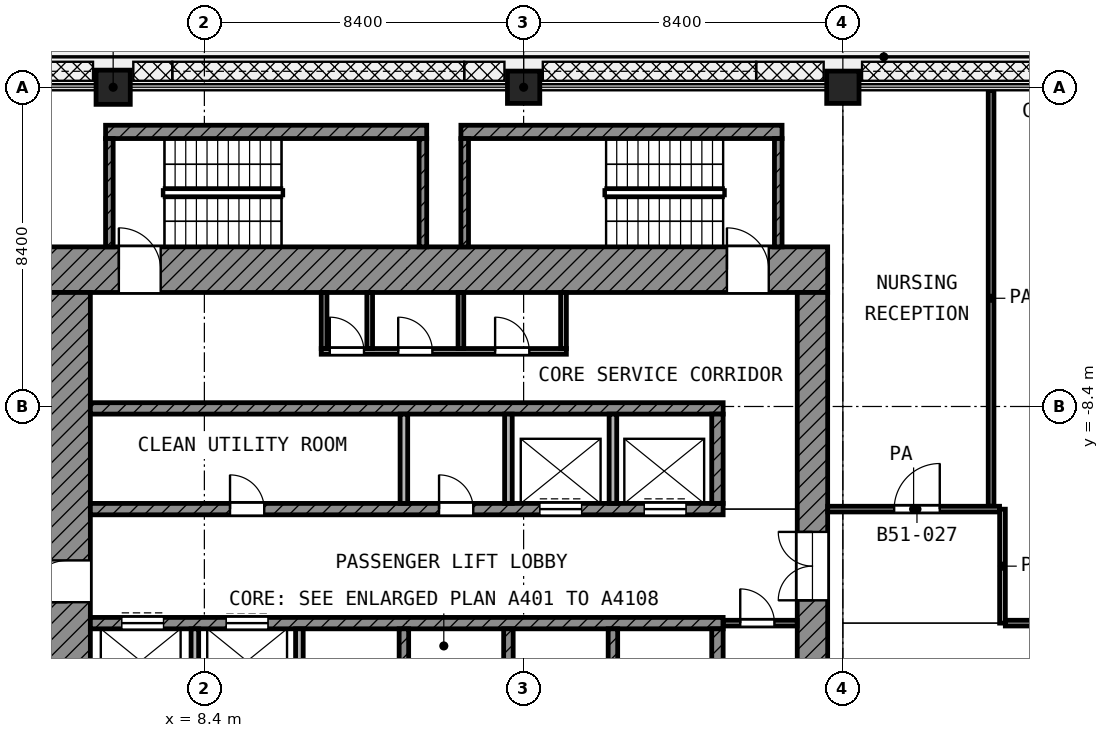
"""IFC4 building model, lengths in metres.
Left out: names, types, materials, properties, quantities, classifications, styles, units other than length and angle.
Written with IfcOpenShell. Run it as: python <this file> out.ifc"""

import sys

from ifc_helpers import new_model, si_unit, direction, frame, frame_2d, origin, origin_2d, place, context, subcontext, project, spatial, rectangle, extrude, element, fill, save


model = new_model("IFC4")
c1 = context("Model", 3, precision=1e-05, world=origin(), true_north=direction((0.0, 1.0)))
c2 = subcontext(c1, "Body", "Model", "MODEL_VIEW")
j1 = project(units=[si_unit("LENGTHUNIT", "METRE"), si_unit("PLANEANGLEUNIT", "RADIAN")], contexts=[c1])
p1 = place(None, origin())
s1 = spatial("IfcSite", under=j1, at=p1, CompositionType="ELEMENT")
p2 = place(p1, origin())
s2 = spatial("IfcBuilding", under=s1, at=p2, CompositionType="ELEMENT")
p3 = place(p2, frame((0.0, 0.0, 222.2)))
s3 = spatial("IfcBuildingStorey", under=s2, at=p3, CompositionType="ELEMENT", Elevation=222.2)
p4 = place(p3, frame((6.0, 0.0, 0.0), z_axis=(0.0, 0.0, 1.0), x_axis=(1.0, 0.0, 0.0)))
e1 = element("IfcColumn", 1, at=p4, inside=s3, PredefinedType="COLUMN", context=c2, shape_type="SweptSolid", body=[
    extrude(rectangle(XDim=0.9, YDim=0.9, at=origin_2d()), origin(), (0.0, 0.0, 1.0), 4.2),
])
for number, where, z_axis, x_axis in (
    (2, (16.8, 0.0, 0.0), (0.0, 0.0, 1.0), (1.0, 0.0, 0.0)),
    (3, (25.2, 0.0, 0.0), (0.0, 0.0, 1.0), (1.0, 0.0, 0.0)),
):
    element("IfcColumn", number, at=place(p3, frame(where, z_axis=z_axis, x_axis=x_axis)), inside=s3, PredefinedType="COLUMN", context=c2, shape_type="SweptSolid", body=[
        extrude(rectangle(XDim=0.85, YDim=0.85, at=origin_2d()), origin(), (0.0, 0.0, 1.0), 4.2),
    ])
p5 = place(p3, frame((4.2, -4.8, 0.0), z_axis=(0.0, 0.0, 1.0), x_axis=(1.0, 0.0, 0.0)))
e4 = element("IfcWall", 4, at=p5, inside=s3, PredefinedType="SHEAR", context=c2, shape_type="SweptSolid", body=[
    extrude(rectangle(XDim=20.6, YDim=1.2, at=frame_2d((10.3, 0.0))), origin(), (0.0, 0.0, 1.0), 3.6),
])
p6 = place(p5, frame((1.95, 0.0, 0.0)))
e5 = element("IfcOpeningElement", 5, at=p6, cuts=e4, PredefinedType="OPENING", context=c2, shape_type="SweptSolid", body=[
    extrude(rectangle(XDim=1.1, YDim=2.1, at=frame_2d((0.55, 1.05))), frame((0.0, 0.61, 0.0), z_axis=(0.0, -1.0, 0.0), x_axis=(1.0, 0.0, 0.0)), (0.0, 0.0, 1.0), 1.22),
])
p7 = place(p5, frame((17.95, 0.0, 0.0)))
e6 = element("IfcOpeningElement", 6, at=p7, cuts=e4, PredefinedType="OPENING", context=c2, shape_type="SweptSolid", body=[
    extrude(rectangle(XDim=1.1, YDim=2.1, at=frame_2d((0.55, 1.05))), frame((0.0, 0.61, 0.0), z_axis=(0.0, -1.0, 0.0), x_axis=(1.0, 0.0, 0.0)), (0.0, 0.0, 1.0), 1.22),
])
p8 = place(p3, frame((4.8, -24.8, 0.0), z_axis=(0.0, 0.0, 1.0), x_axis=(0.0, 1.0, 0.0)))
e7 = element("IfcWall", 7, at=p8, inside=s3, PredefinedType="SHEAR", context=c2, shape_type="SweptSolid", body=[
    extrude(rectangle(XDim=19.4, YDim=1.2, at=frame_2d((9.7, 0.0))), origin(), (0.0, 0.0, 1.0), 3.6),
])
p9 = place(p8, frame((11.25, 0.0, 0.0)))
e8 = element("IfcOpeningElement", 8, at=p9, cuts=e7, PredefinedType="OPENING", context=c2, shape_type="SweptSolid", body=[
    extrude(rectangle(XDim=1.1, YDim=2.1, at=frame_2d((0.55, 1.05))), frame((0.0, 0.61, 0.0), z_axis=(0.0, -1.0, 0.0), x_axis=(1.0, 0.0, 0.0)), (0.0, 0.0, 1.0), 1.22),
])
p10 = place(p8, frame((1.95, 0.0, 0.0)))
e9 = element("IfcOpeningElement", 9, at=p10, cuts=e7, PredefinedType="OPENING", context=c2, shape_type="SweptSolid", body=[
    extrude(rectangle(XDim=1.1, YDim=2.1, at=frame_2d((0.55, 1.05))), frame((0.0, 0.61, 0.0), z_axis=(0.0, -1.0, 0.0), x_axis=(1.0, 0.0, 0.0)), (0.0, 0.0, 1.0), 1.22),
])
p11 = place(p3, frame((24.4, -24.0, 0.0), z_axis=(0.0, 0.0, 1.0), x_axis=(0.0, 1.0, 0.0)))
e10 = element("IfcWall", 10, at=p11, inside=s3, PredefinedType="SHEAR", context=c2, shape_type="SweptSolid", body=[
    extrude(rectangle(XDim=18.6, YDim=0.8, at=frame_2d((9.3, 0.0))), origin(), (0.0, 0.0, 1.0), 3.6),
])
p12 = place(p11, frame((10.5, 0.0, 0.0)))
e11 = element("IfcOpeningElement", 11, at=p12, cuts=e10, PredefinedType="OPENING", context=c2, shape_type="SweptSolid", body=[
    extrude(rectangle(XDim=1.8, YDim=2.1, at=frame_2d((0.9, 1.05))), frame((0.0, 0.41, 0.0), z_axis=(0.0, -1.0, 0.0), x_axis=(1.0, 0.0, 0.0)), (0.0, 0.0, 1.0), 0.82),
])
p13 = place(p3, frame((5.4, -8.45, 0.0), z_axis=(0.0, 0.0, 1.0), x_axis=(1.0, 0.0, 0.0)))
e12 = element("IfcWall", 12, at=p13, inside=s3, PredefinedType="SHEAR", context=c2, shape_type="SweptSolid", body=[
    extrude(rectangle(XDim=16.65, YDim=0.3, at=frame_2d((8.325, 0.0))), origin(), (0.0, 0.0, 1.0), 3.6),
])
p14 = place(p3, frame((5.4, -11.1, 0.0), z_axis=(0.0, 0.0, 1.0), x_axis=(1.0, 0.0, 0.0)))
e13 = element("IfcWall", 13, at=p14, inside=s3, PredefinedType="SHEAR", context=c2, shape_type="SweptSolid", body=[
    extrude(rectangle(XDim=16.65, YDim=0.3, at=frame_2d((8.325, 0.0))), origin(), (0.0, 0.0, 1.0), 3.6),
])
p15 = place(p14, frame((11.825, 0.0, 0.0)))
e14 = element("IfcOpeningElement", 14, at=p15, cuts=e13, PredefinedType="OPENING", context=c2, shape_type="SweptSolid", body=[
    extrude(rectangle(XDim=1.1, YDim=2.1, at=frame_2d((0.55, 1.05))), frame((0.0, 0.16, 0.0), z_axis=(0.0, -1.0, 0.0), x_axis=(1.0, 0.0, 0.0)), (0.0, 0.0, 1.0), 0.32),
])
p16 = place(p14, frame((14.575, 0.0, 0.0)))
e15 = element("IfcOpeningElement", 15, at=p16, cuts=e13, PredefinedType="OPENING", context=c2, shape_type="SweptSolid", body=[
    extrude(rectangle(XDim=1.1, YDim=2.1, at=frame_2d((0.55, 1.05))), frame((0.0, 0.16, 0.0), z_axis=(0.0, -1.0, 0.0), x_axis=(1.0, 0.0, 0.0)), (0.0, 0.0, 1.0), 0.32),
])
p17 = place(p14, frame((3.675, 0.0, 0.0)))
e16 = element("IfcOpeningElement", 16, at=p17, cuts=e13, PredefinedType="OPENING", context=c2, shape_type="SweptSolid", body=[
    extrude(rectangle(XDim=0.9, YDim=2.1, at=frame_2d((0.45, 1.05))), frame((0.0, 0.16, 0.0), z_axis=(0.0, -1.0, 0.0), x_axis=(1.0, 0.0, 0.0)), (0.0, 0.0, 1.0), 0.32),
])
p18 = place(p14, frame((9.175, 0.0, 0.0)))
e17 = element("IfcOpeningElement", 17, at=p18, cuts=e13, PredefinedType="OPENING", context=c2, shape_type="SweptSolid", body=[
    extrude(rectangle(XDim=0.9, YDim=2.1, at=frame_2d((0.45, 1.05))), frame((0.0, 0.16, 0.0), z_axis=(0.0, -1.0, 0.0), x_axis=(1.0, 0.0, 0.0)), (0.0, 0.0, 1.0), 0.32),
])
p19 = place(p3, frame((5.4, -14.1, 0.0), z_axis=(0.0, 0.0, 1.0), x_axis=(1.0, 0.0, 0.0)))
e18 = element("IfcWall", 18, at=p19, inside=s3, PredefinedType="SHEAR", context=c2, shape_type="SweptSolid", body=[
    extrude(rectangle(XDim=16.65, YDim=0.3, at=frame_2d((8.325, 0.0))), origin(), (0.0, 0.0, 1.0), 3.6),
])
p20 = place(p19, frame((0.825, 0.0, 0.0)))
e19 = element("IfcOpeningElement", 19, at=p20, cuts=e18, PredefinedType="OPENING", context=c2, shape_type="SweptSolid", body=[
    extrude(rectangle(XDim=1.1, YDim=2.1, at=frame_2d((0.55, 1.05))), frame((0.0, 0.16, 0.0), z_axis=(0.0, -1.0, 0.0), x_axis=(1.0, 0.0, 0.0)), (0.0, 0.0, 1.0), 0.32),
])
p21 = place(p19, frame((3.575, 0.0, 0.0)))
e20 = element("IfcOpeningElement", 20, at=p21, cuts=e18, PredefinedType="OPENING", context=c2, shape_type="SweptSolid", body=[
    extrude(rectangle(XDim=1.1, YDim=2.1, at=frame_2d((0.55, 1.05))), frame((0.0, 0.16, 0.0), z_axis=(0.0, -1.0, 0.0), x_axis=(1.0, 0.0, 0.0)), (0.0, 0.0, 1.0), 0.32),
])
p22 = place(p3, frame((21.9, -10.95, 0.0), z_axis=(0.0, 0.0, 1.0), x_axis=(0.0, 1.0, 0.0)))
e21 = element("IfcWall", 21, at=p22, inside=s3, PredefinedType="SHEAR", context=c2, shape_type="SweptSolid", body=[
    extrude(rectangle(XDim=2.35, YDim=0.3, at=frame_2d((1.175, 0.0))), origin(), (0.0, 0.0, 1.0), 3.6),
])
p23 = place(p3, frame((21.9, -16.6, 0.0), z_axis=(0.0, 0.0, 1.0), x_axis=(0.0, 1.0, 0.0)))
e22 = element("IfcWall", 22, at=p23, inside=s3, PredefinedType="SHEAR", context=c2, shape_type="SweptSolid", body=[
    extrude(rectangle(XDim=2.35, YDim=0.3, at=frame_2d((1.175, 0.0))), origin(), (0.0, 0.0, 1.0), 3.6),
])
for number, where, z_axis, x_axis in (
    (23, (13.65, -10.95, 0.0), (0.0, 0.0, 1.0), (0.0, 1.0, 0.0)),
    (24, (16.4, -10.95, 0.0), (0.0, 0.0, 1.0), (0.0, 1.0, 0.0)),
    (25, (19.15, -10.95, 0.0), (0.0, 0.0, 1.0), (0.0, 1.0, 0.0)),
):
    element("IfcWall", number, at=place(p3, frame(where, z_axis=z_axis, x_axis=x_axis)), inside=s3, PredefinedType="PARTITIONING", context=c2, shape_type="SweptSolid", body=[
        extrude(rectangle(XDim=2.35, YDim=0.2, at=frame_2d((1.175, 0.0))), origin(), (0.0, 0.0, 1.0), 3.6),
    ])
for number, where, z_axis, x_axis in (
    (26, (8.15, -16.6, 0.0), (0.0, 0.0, 1.0), (0.0, 1.0, 0.0)),
    (27, (10.9, -16.6, 0.0), (0.0, 0.0, 1.0), (0.0, 1.0, 0.0)),
):
    element("IfcWall", number, at=place(p3, frame(where, z_axis=z_axis, x_axis=x_axis)), inside=s3, PredefinedType="PARTITIONING", context=c2, shape_type="SweptSolid", body=[
        extrude(rectangle(XDim=2.35, YDim=0.2, at=frame_2d((1.175, 0.0))), origin(), (0.0, 0.0, 1.0), 3.6),
    ])
for number, where, z_axis, x_axis in (
    (28, (13.65, -16.6, 0.0), (0.0, 0.0, 1.0), (0.0, 1.0, 0.0)),
    (29, (16.4, -16.6, 0.0), (0.0, 0.0, 1.0), (0.0, 1.0, 0.0)),
    (30, (19.15, -16.6, 0.0), (0.0, 0.0, 1.0), (0.0, 1.0, 0.0)),
):
    element("IfcWall", number, at=place(p3, frame(where, z_axis=z_axis, x_axis=x_axis)), inside=s3, PredefinedType="SHEAR", context=c2, shape_type="SweptSolid", body=[
        extrude(rectangle(XDim=2.35, YDim=0.25, at=frame_2d((1.175, 0.0))), origin(), (0.0, 0.0, 1.0), 3.6),
    ])
p24 = place(p3, frame((22.05, -14.1, 0.0), z_axis=(0.0, 0.0, 1.0), x_axis=(1.0, 0.0, 0.0)))
e31 = element("IfcWall", 31, at=p24, inside=s3, PredefinedType="PARTITIONING", context=c2, shape_type="SweptSolid", body=[
    extrude(rectangle(XDim=1.95, YDim=0.15, at=frame_2d((0.975, 0.0))), origin(), (0.0, 0.0, 1.0), 3.6),
])
p25 = place(p24, frame((0.45, 0.0, 0.0)))
e32 = element("IfcOpeningElement", 32, at=p25, cuts=e31, PredefinedType="OPENING", context=c2, shape_type="SweptSolid", body=[
    extrude(rectangle(XDim=0.9, YDim=2.1, at=frame_2d((0.45, 1.05))), frame((0.0, 0.085, 0.0), z_axis=(0.0, -1.0, 0.0), x_axis=(1.0, 0.0, 0.0)), (0.0, 0.0, 1.0), 0.17),
])
p26 = place(p3, frame((11.475, -6.95, 0.0), z_axis=(0.0, 0.0, 1.0), x_axis=(1.0, 0.0, 0.0)))
e33 = element("IfcWall", 33, at=p26, inside=s3, PredefinedType="PARTITIONING", context=c2, shape_type="SweptSolid", body=[
    extrude(rectangle(XDim=6.45, YDim=0.15, at=frame_2d((3.225, 0.0))), origin(), (0.0, 0.0, 1.0), 3.6),
])
p27 = place(p26, frame((0.225, 0.0, 0.0)))
e34 = element("IfcOpeningElement", 34, at=p27, cuts=e33, PredefinedType="OPENING", context=c2, shape_type="SweptSolid", body=[
    extrude(rectangle(XDim=0.9, YDim=2.1, at=frame_2d((0.45, 1.05))), frame((0.0, 0.085, 0.0), z_axis=(0.0, -1.0, 0.0), x_axis=(1.0, 0.0, 0.0)), (0.0, 0.0, 1.0), 0.17),
])
p28 = place(p26, frame((2.025, 0.0, 0.0)))
e35 = element("IfcOpeningElement", 35, at=p28, cuts=e33, PredefinedType="OPENING", context=c2, shape_type="SweptSolid", body=[
    extrude(rectangle(XDim=0.9, YDim=2.1, at=frame_2d((0.45, 1.05))), frame((0.0, 0.085, 0.0), z_axis=(0.0, -1.0, 0.0), x_axis=(1.0, 0.0, 0.0)), (0.0, 0.0, 1.0), 0.17),
])
p29 = place(p26, frame((4.575, 0.0, 0.0)))
e36 = element("IfcOpeningElement", 36, at=p29, cuts=e33, PredefinedType="OPENING", context=c2, shape_type="SweptSolid", body=[
    extrude(rectangle(XDim=0.9, YDim=2.1, at=frame_2d((0.45, 1.05))), frame((0.0, 0.085, 0.0), z_axis=(0.0, -1.0, 0.0), x_axis=(1.0, 0.0, 0.0)), (0.0, 0.0, 1.0), 0.17),
])
for number, where, z_axis, x_axis in (
    (37, (11.55, -6.875, 0.0), (0.0, 0.0, 1.0), (0.0, 1.0, 0.0)),
    (38, (12.75, -6.875, 0.0), (0.0, 0.0, 1.0), (0.0, 1.0, 0.0)),
    (39, (15.15, -6.875, 0.0), (0.0, 0.0, 1.0), (0.0, 1.0, 0.0)),
    (40, (17.85, -6.875, 0.0), (0.0, 0.0, 1.0), (0.0, 1.0, 0.0)),
):
    element("IfcWall", number, at=place(p3, frame(where, z_axis=z_axis, x_axis=x_axis)), inside=s3, PredefinedType="PARTITIONING", context=c2, shape_type="SweptSolid", body=[
        extrude(rectangle(XDim=1.475, YDim=0.15, at=frame_2d((0.738, 0.0))), origin(), (0.0, 0.0, 1.0), 3.6),
    ])
p30 = place(p3, frame((5.8, -1.175, 0.0), z_axis=(0.0, 0.0, 1.0), x_axis=(1.0, 0.0, 0.0)))
e41 = element("IfcWall", 41, at=p30, inside=s3, PredefinedType="SHEAR", context=c2, shape_type="SweptSolid", body=[
    extrude(rectangle(XDim=8.45, YDim=0.35, at=frame_2d((4.225, 0.0))), origin(), (0.0, 0.0, 1.0), 3.6),
])
for number, where, z_axis, x_axis in (
    (42, (5.9, -4.2, 0.0), (0.0, 0.0, 1.0), (0.0, 1.0, 0.0)),
    (43, (14.15, -4.2, 0.0), (0.0, 0.0, 1.0), (0.0, 1.0, 0.0)),
):
    element("IfcWall", number, at=place(p3, frame(where, z_axis=z_axis, x_axis=x_axis)), inside=s3, PredefinedType="SHEAR", context=c2, shape_type="SweptSolid", body=[
        extrude(rectangle(XDim=2.85, YDim=0.2, at=frame_2d((1.425, 0.0))), origin(), (0.0, 0.0, 1.0), 3.6),
    ])
p31 = place(p3, frame((15.15, -1.175, 0.0), z_axis=(0.0, 0.0, 1.0), x_axis=(1.0, 0.0, 0.0)))
e44 = element("IfcWall", 44, at=p31, inside=s3, PredefinedType="SHEAR", context=c2, shape_type="SweptSolid", body=[
    extrude(rectangle(XDim=8.45, YDim=0.35, at=frame_2d((4.225, 0.0))), origin(), (0.0, 0.0, 1.0), 3.6),
])
for number, where, z_axis, x_axis in (
    (45, (15.25, -4.2, 0.0), (0.0, 0.0, 1.0), (0.0, 1.0, 0.0)),
    (46, (23.5, -4.2, 0.0), (0.0, 0.0, 1.0), (0.0, 1.0, 0.0)),
):
    element("IfcWall", number, at=place(p3, frame(where, z_axis=z_axis, x_axis=x_axis)), inside=s3, PredefinedType="SHEAR", context=c2, shape_type="SweptSolid", body=[
        extrude(rectangle(XDim=2.85, YDim=0.2, at=frame_2d((1.425, 0.0))), origin(), (0.0, 0.0, 1.0), 3.6),
    ])
p32 = place(p3, frame((29.475, -14.1, 0.0), z_axis=(0.0, 0.0, 1.0), x_axis=(1.0, 0.0, 0.0)))
e47 = element("IfcWall", 47, at=p32, inside=s3, PredefinedType="PARTITIONING", context=c2, shape_type="SweptSolid", body=[
    extrude(rectangle(XDim=10.757, YDim=0.15, at=frame_2d((5.378, 0.0))), origin(), (0.0, 0.0, 1.0), 3.6),
])
p33 = place(p32, frame((1.525, 0.0, 0.0)))
e48 = element("IfcOpeningElement", 48, at=p33, cuts=e47, PredefinedType="OPENING", context=c2, shape_type="SweptSolid", body=[
    extrude(rectangle(XDim=1.0, YDim=2.1, at=frame_2d((0.5, 1.05))), frame((0.0, 0.085, 0.0), z_axis=(0.0, -1.0, 0.0), x_axis=(1.0, 0.0, 0.0)), (0.0, 0.0, 1.0), 0.17),
])
p34 = place(p32, frame((4.725, 0.0, 0.0)))
e49 = element("IfcOpeningElement", 49, at=p34, cuts=e47, PredefinedType="OPENING", context=c2, shape_type="SweptSolid", body=[
    extrude(rectangle(XDim=0.9, YDim=2.1, at=frame_2d((0.45, 1.05))), frame((0.0, 0.085, 0.0), z_axis=(0.0, -1.0, 0.0), x_axis=(1.0, 0.0, 0.0)), (0.0, 0.0, 1.0), 0.17),
])
p35 = place(p32, frame((6.775, 0.0, 0.0)))
e50 = element("IfcOpeningElement", 50, at=p35, cuts=e47, PredefinedType="OPENING", context=c2, shape_type="SweptSolid", body=[
    extrude(rectangle(XDim=1.0, YDim=2.1, at=frame_2d((0.5, 1.05))), frame((0.0, 0.085, 0.0), z_axis=(0.0, -1.0, 0.0), x_axis=(1.0, 0.0, 0.0)), (0.0, 0.0, 1.0), 0.17),
])
p36 = place(p3, frame((24.8, -11.1, 0.0), z_axis=(0.0, 0.0, 1.0), x_axis=(1.0, 0.0, 0.0)))
e51 = element("IfcWall", 51, at=p36, inside=s3, PredefinedType="PARTITIONING", context=c2, shape_type="SweptSolid", body=[
    extrude(rectangle(XDim=4.523, YDim=0.15, at=frame_2d((2.261, 0.0))), origin(), (0.0, 0.0, 1.0), 3.6),
])
p37 = place(p36, frame((1.75, 0.0, 0.0)))
e52 = element("IfcOpeningElement", 52, at=p37, cuts=e51, PredefinedType="OPENING", context=c2, shape_type="SweptSolid", body=[
    extrude(rectangle(XDim=1.2, YDim=2.1, at=frame_2d((0.6, 1.05))), frame((0.0, 0.085, 0.0), z_axis=(0.0, -1.0, 0.0), x_axis=(1.0, 0.0, 0.0)), (0.0, 0.0, 1.0), 0.17),
])
p38 = place(p3, frame((29.1, -11.025, 0.0), z_axis=(0.0, 0.0, 1.0), x_axis=(0.0, 1.0, 0.0)))
e53 = element("IfcWall", 53, at=p38, inside=s3, PredefinedType="PARTITIONING", context=c2, shape_type="SweptSolid", body=[
    extrude(rectangle(XDim=10.945, YDim=0.15, at=frame_2d((5.472, 0.0))), origin(), (0.0, 0.0, 1.0), 3.6),
])
p39 = place(p3, frame((29.4, -14.1, 0.0), z_axis=(0.0, 0.0, 1.0), x_axis=(0.0, 1.0, 0.0)))
e54 = element("IfcWall", 54, at=p39, inside=s3, PredefinedType="PARTITIONING", context=c2, shape_type="SweptSolid", body=[
    extrude(rectangle(XDim=2.998, YDim=0.15, at=frame_2d((1.499, 0.0))), origin(), (0.0, 0.0, 1.0), 3.6),
])
p40 = place(p15, origin())
e55 = element("IfcDoor", 55, at=p40, inside=s3, OperationType="DOUBLE_DOOR_SLIDING", PredefinedType="DOOR", context=c2, shape_type="SweptSolid", body=[
    extrude(rectangle(XDim=1.1, YDim=2.1, at=frame_2d((0.55, 1.05))), frame((0.0, 0.025, 0.0), z_axis=(0.0, -1.0, 0.0), x_axis=(1.0, 0.0, 0.0)), (0.0, 0.0, 1.0), 0.05),
])
fill(e14, e55)
p41 = place(p16, origin())
e56 = element("IfcDoor", 56, at=p41, inside=s3, OperationType="DOUBLE_DOOR_SLIDING", PredefinedType="DOOR", context=c2, shape_type="SweptSolid", body=[
    extrude(rectangle(XDim=1.1, YDim=2.1, at=frame_2d((0.55, 1.05))), frame((0.0, 0.025, 0.0), z_axis=(0.0, -1.0, 0.0), x_axis=(1.0, 0.0, 0.0)), (0.0, 0.0, 1.0), 0.05),
])
fill(e15, e56)
p42 = place(p20, origin())
e57 = element("IfcDoor", 57, at=p42, inside=s3, OperationType="DOUBLE_DOOR_SLIDING", PredefinedType="DOOR", context=c2, shape_type="SweptSolid", body=[
    extrude(rectangle(XDim=1.1, YDim=2.1, at=frame_2d((0.55, 1.05))), frame((0.0, 0.025, 0.0), z_axis=(0.0, -1.0, 0.0), x_axis=(1.0, 0.0, 0.0)), (0.0, 0.0, 1.0), 0.05),
])
fill(e19, e57)
p43 = place(p21, origin())
e58 = element("IfcDoor", 58, at=p43, inside=s3, OperationType="DOUBLE_DOOR_SLIDING", PredefinedType="DOOR", context=c2, shape_type="SweptSolid", body=[
    extrude(rectangle(XDim=1.1, YDim=2.1, at=frame_2d((0.55, 1.05))), frame((0.0, 0.025, 0.0), z_axis=(0.0, -1.0, 0.0), x_axis=(1.0, 0.0, 0.0)), (0.0, 0.0, 1.0), 0.05),
])
fill(e20, e58)
p44 = place(p9, origin())
e59 = element("IfcDoor", 59, at=p44, inside=s3, OperationType="SINGLE_SWING_LEFT", PredefinedType="DOOR", context=c2, shape_type="SweptSolid", body=[
    extrude(rectangle(XDim=1.1, YDim=2.1, at=frame_2d((0.55, 1.05))), frame((0.0, 0.025, 0.0), z_axis=(0.0, -1.0, 0.0), x_axis=(1.0, 0.0, 0.0)), (0.0, 0.0, 1.0), 0.05),
])
fill(e8, e59)
p45 = place(p6, origin())
e60 = element("IfcDoor", 60, at=p45, inside=s3, OperationType="SINGLE_SWING_LEFT", PredefinedType="DOOR", context=c2, shape_type="SweptSolid", body=[
    extrude(rectangle(XDim=1.1, YDim=2.1, at=frame_2d((0.55, 1.05))), frame((0.0, 0.025, 0.0), z_axis=(0.0, -1.0, 0.0), x_axis=(1.0, 0.0, 0.0)), (0.0, 0.0, 1.0), 0.05),
])
fill(e5, e60)
p46 = place(p7, origin())
e61 = element("IfcDoor", 61, at=p46, inside=s3, OperationType="SINGLE_SWING_LEFT", PredefinedType="DOOR", context=c2, shape_type="SweptSolid", body=[
    extrude(rectangle(XDim=1.1, YDim=2.1, at=frame_2d((0.55, 1.05))), frame((0.0, 0.025, 0.0), z_axis=(0.0, -1.0, 0.0), x_axis=(1.0, 0.0, 0.0)), (0.0, 0.0, 1.0), 0.05),
])
fill(e6, e61)
p47 = place(p12, origin())
e62 = element("IfcDoor", 62, at=p47, inside=s3, OperationType="DOUBLE_DOOR_SINGLE_SWING", PredefinedType="DOOR", context=c2, shape_type="SweptSolid", body=[
    extrude(rectangle(XDim=1.8, YDim=2.1, at=frame_2d((0.9, 1.05))), frame((0.0, 0.025, 0.0), z_axis=(0.0, -1.0, 0.0), x_axis=(1.0, 0.0, 0.0)), (0.0, 0.0, 1.0), 0.05),
])
fill(e11, e62)
p48 = place(p27, origin())
e63 = element("IfcDoor", 63, at=p48, inside=s3, OperationType="SINGLE_SWING_LEFT", PredefinedType="DOOR", context=c2, shape_type="SweptSolid", body=[
    extrude(rectangle(XDim=0.9, YDim=2.1, at=frame_2d((0.45, 1.05))), frame((0.0, 0.025, 0.0), z_axis=(0.0, -1.0, 0.0), x_axis=(1.0, 0.0, 0.0)), (0.0, 0.0, 1.0), 0.05),
])
fill(e34, e63)
p49 = place(p28, origin())
e64 = element("IfcDoor", 64, at=p49, inside=s3, OperationType="SINGLE_SWING_LEFT", PredefinedType="DOOR", context=c2, shape_type="SweptSolid", body=[
    extrude(rectangle(XDim=0.9, YDim=2.1, at=frame_2d((0.45, 1.05))), frame((0.0, 0.025, 0.0), z_axis=(0.0, -1.0, 0.0), x_axis=(1.0, 0.0, 0.0)), (0.0, 0.0, 1.0), 0.05),
])
fill(e35, e64)
p50 = place(p29, origin())
e65 = element("IfcDoor", 65, at=p50, inside=s3, OperationType="SINGLE_SWING_LEFT", PredefinedType="DOOR", context=c2, shape_type="SweptSolid", body=[
    extrude(rectangle(XDim=0.9, YDim=2.1, at=frame_2d((0.45, 1.05))), frame((0.0, 0.025, 0.0), z_axis=(0.0, -1.0, 0.0), x_axis=(1.0, 0.0, 0.0)), (0.0, 0.0, 1.0), 0.05),
])
fill(e36, e65)
p51 = place(p25, origin())
e66 = element("IfcDoor", 66, at=p51, inside=s3, OperationType="SINGLE_SWING_LEFT", PredefinedType="DOOR", context=c2, shape_type="SweptSolid", body=[
    extrude(rectangle(XDim=0.9, YDim=2.1, at=frame_2d((0.45, 1.05))), frame((0.0, 0.025, 0.0), z_axis=(0.0, -1.0, 0.0), x_axis=(1.0, 0.0, 0.0)), (0.0, 0.0, 1.0), 0.05),
])
fill(e32, e66)
p52 = place(p17, origin())
e67 = element("IfcDoor", 67, at=p52, inside=s3, OperationType="SINGLE_SWING_LEFT", PredefinedType="DOOR", context=c2, shape_type="SweptSolid", body=[
    extrude(rectangle(XDim=0.9, YDim=2.1, at=frame_2d((0.45, 1.05))), frame((0.0, 0.025, 0.0), z_axis=(0.0, -1.0, 0.0), x_axis=(1.0, 0.0, 0.0)), (0.0, 0.0, 1.0), 0.05),
])
fill(e16, e67)
p53 = place(p18, origin())
e68 = element("IfcDoor", 68, at=p53, inside=s3, OperationType="SINGLE_SWING_LEFT", PredefinedType="DOOR", context=c2, shape_type="SweptSolid", body=[
    extrude(rectangle(XDim=0.9, YDim=2.1, at=frame_2d((0.45, 1.05))), frame((0.0, 0.025, 0.0), z_axis=(0.0, -1.0, 0.0), x_axis=(1.0, 0.0, 0.0)), (0.0, 0.0, 1.0), 0.05),
])
fill(e17, e68)
p54 = place(p37, origin())
e69 = element("IfcDoor", 69, at=p54, inside=s3, OperationType="SINGLE_SWING_RIGHT", PredefinedType="DOOR", context=c2, shape_type="SweptSolid", body=[
    extrude(rectangle(XDim=1.2, YDim=2.1, at=frame_2d((0.6, 1.05))), frame((0.0, 0.025, 0.0), z_axis=(0.0, -1.0, 0.0), x_axis=(1.0, 0.0, 0.0)), (0.0, 0.0, 1.0), 0.05),
])
fill(e52, e69)
save(model, sys.argv[1])
